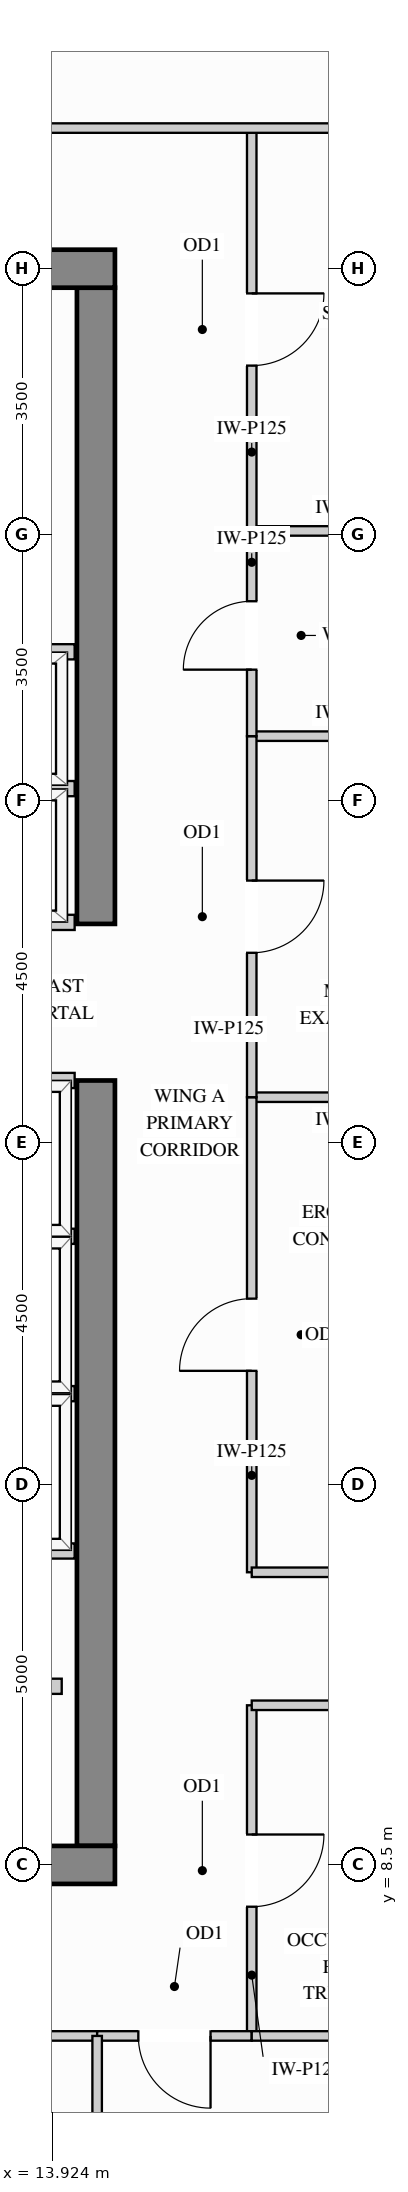
"""IFC4 building model, lengths in metres.
Left out: names, types, materials, properties, quantities, classifications, styles, units other than length and angle.
Written with IfcOpenShell. Run it as: python <this file> out.ifc"""

import sys

from ifc_helpers import new_model, si_unit, direction, frame, frame_2d, origin, place, context, subcontext, project, spatial, rectangle, extrude, source, transform, mapped, element, fill, save


model = new_model("IFC4")
c1 = context("Model", 3, precision=1e-05, world=origin(), true_north=direction((0.0, 1.0)))
c2 = subcontext(c1, "Body", "Model", "MODEL_VIEW")
j1 = project(units=[si_unit("LENGTHUNIT", "METRE"), si_unit("PLANEANGLEUNIT", "RADIAN")], contexts=[c1])
p1 = place(None, origin())
s1 = spatial("IfcSite", under=j1, at=p1, CompositionType="ELEMENT")
p2 = place(p1, origin())
s2 = spatial("IfcBuilding", under=s1, at=p2, CompositionType="ELEMENT")
p3 = place(p2, frame((0.0, 0.0, 248.4)))
s3 = spatial("IfcBuildingStorey", under=s2, at=p3, CompositionType="ELEMENT", Elevation=248.4)
m1 = source(origin(), c2, "Body", "SweptSolid", [
    extrude(rectangle(XDim=10.07, YDim=0.5, at=frame_2d((5.035, 0.0))), origin(), (0.0, 0.0, 1.0), 3.4),
])
p4 = place(p3, frame((14.5, 8.75, 0.0), z_axis=(0.0, 0.0, 1.0), x_axis=(0.0, 1.0, 0.0)))
e1 = element("IfcWall", 1, at=p4, inside=s3, PredefinedType="SHEAR", context=c2, shape_type="MappedRepresentation", body=[
    mapped(m1, transform((0.0, 0.0, 0.0), x_axis=(1.0, 0.0, 0.0), y_axis=(0.0, 1.0, 0.0), z_axis=(0.0, 0.0, 1.0))),
])
m2 = source(origin(), c2, "Body", "SweptSolid", [
    extrude(rectangle(XDim=8.37, YDim=0.5, at=frame_2d((4.185, 0.0))), origin(), (0.0, 0.0, 1.0), 3.4),
])
p5 = place(p3, frame((14.5, 20.88, 0.0), z_axis=(0.0, 0.0, 1.0), x_axis=(0.0, 1.0, 0.0)))
e2 = element("IfcWall", 2, at=p5, inside=s3, PredefinedType="SHEAR", context=c2, shape_type="MappedRepresentation", body=[
    mapped(m2, transform((0.0, 0.0, 0.0), x_axis=(1.0, 0.0, 0.0), y_axis=(0.0, 1.0, 0.0), z_axis=(0.0, 0.0, 1.0))),
])
m3 = source(origin(), c2, "Body", "SweptSolid", [
    extrude(rectangle(XDim=10.5, YDim=0.5, at=frame_2d((5.25, 0.0))), origin(), (0.0, 0.0, 1.0), 3.4),
])
for number, where, z_axis, x_axis in (
    (3, (4.25, 29.5, 0.0), (0.0, 0.0, 1.0), (1.0, 0.0, 0.0)),
    (4, (4.25, 8.5, 0.0), (0.0, 0.0, 1.0), (1.0, 0.0, 0.0)),
):
    element("IfcWall", number, at=place(p3, frame(where, z_axis=z_axis, x_axis=x_axis)), inside=s3, PredefinedType="SHEAR", context=c2, shape_type="MappedRepresentation", body=[
        mapped(m3, transform((0.0, 0.0, 0.0), x_axis=(1.0, 0.0, 0.0), y_axis=(0.0, 1.0, 0.0), z_axis=(0.0, 0.0, 1.0))),
    ])
m4 = source(origin(), c2, "Body", "SweptSolid", [
    extrude(rectangle(XDim=2.598, YDim=0.125, at=frame_2d((1.299, 0.0))), origin(), (0.0, 0.0, 1.0), 3.385),
])
for number, where, z_axis, x_axis in (
    (5, (16.55, 18.6, 0.0), (0.0, 0.0, 1.0), (1.0, 0.0, 0.0)),
    (6, (16.55, 23.35, 0.0), (0.0, 0.0, 1.0), (1.0, 0.0, 0.0)),
    (7, (16.55, 26.05, 0.0), (0.0, 0.0, 1.0), (1.0, 0.0, 0.0)),
):
    element("IfcWall", number, at=place(p3, frame(where, z_axis=z_axis, x_axis=x_axis)), inside=s3, PredefinedType="PARTITIONING", context=c2, shape_type="MappedRepresentation", body=[
        mapped(m4, transform((0.0, 0.0, 0.0), x_axis=(1.0, 0.0, 0.0), y_axis=(0.0, 1.0, 0.0), z_axis=(0.0, 0.0, 1.0))),
    ])
p6 = place(p3, frame((16.55, 12.35, 0.0), z_axis=(0.0, 0.0, 1.0), x_axis=(0.0, 1.0, 0.0)))
e8 = element("IfcWall", 8, at=p6, inside=s3, PredefinedType="PARTITIONING", context=c2, shape_type="SweptSolid", body=[
    extrude(rectangle(XDim=6.25, YDim=0.125, at=frame_2d((3.125, 0.0))), origin(), (0.0, 0.0, 1.0), 3.385),
])
p7 = place(p6, frame((2.65, 0.0, 0.0)))
e9 = element("IfcOpeningElement", 9, at=p7, cuts=e8, PredefinedType="OPENING", context=c2, shape_type="SweptSolid", body=[
    extrude(rectangle(XDim=0.95, YDim=2.15, at=frame_2d((0.475, 1.075))), frame((0.0, 0.073, 0.0), z_axis=(0.0, -1.0, 0.0), x_axis=(1.0, 0.0, 0.0)), (0.0, 0.0, 1.0), 0.145),
])
p8 = place(p3, frame((16.55, 18.6, 0.0), z_axis=(0.0, 0.0, 1.0), x_axis=(0.0, 1.0, 0.0)))
e10 = element("IfcWall", 10, at=p8, inside=s3, PredefinedType="PARTITIONING", context=c2, shape_type="SweptSolid", body=[
    extrude(rectangle(XDim=4.75, YDim=0.125, at=frame_2d((2.375, 0.0))), origin(), (0.0, 0.0, 1.0), 3.385),
])
p9 = place(p8, frame((1.9, 0.0, 0.0)))
e11 = element("IfcOpeningElement", 11, at=p9, cuts=e10, PredefinedType="OPENING", context=c2, shape_type="SweptSolid", body=[
    extrude(rectangle(XDim=0.95, YDim=2.15, at=frame_2d((0.475, 1.075))), frame((0.0, 0.073, 0.0), z_axis=(0.0, -1.0, 0.0), x_axis=(1.0, 0.0, 0.0)), (0.0, 0.0, 1.0), 0.145),
])
p10 = place(p3, frame((16.55, 26.05, 0.0), z_axis=(0.0, 0.0, 1.0), x_axis=(0.0, 1.0, 0.0)))
e12 = element("IfcWall", 12, at=p10, inside=s3, PredefinedType="PARTITIONING", context=c2, shape_type="SweptSolid", body=[
    extrude(rectangle(XDim=5.3, YDim=0.125, at=frame_2d((2.65, 0.0))), origin(), (0.0, 0.0, 1.0), 3.385),
])
p11 = place(p10, frame((2.175, 0.0, 0.0)))
e13 = element("IfcOpeningElement", 13, at=p11, cuts=e12, PredefinedType="OPENING", context=c2, shape_type="SweptSolid", body=[
    extrude(rectangle(XDim=0.95, YDim=2.15, at=frame_2d((0.475, 1.075))), frame((0.0, 0.073, 0.0), z_axis=(0.0, -1.0, 0.0), x_axis=(1.0, 0.0, 0.0)), (0.0, 0.0, 1.0), 0.145),
])
p12 = place(p3, frame((16.55, 6.25, 0.0), z_axis=(0.0, 0.0, 1.0), x_axis=(0.0, 1.0, 0.0)))
e14 = element("IfcWall", 14, at=p12, inside=s3, PredefinedType="PARTITIONING", context=c2, shape_type="SweptSolid", body=[
    extrude(rectangle(XDim=4.35, YDim=0.125, at=frame_2d((2.175, 0.0))), origin(), (0.0, 0.0, 1.0), 3.385),
])
p13 = place(p12, frame((1.7, 0.0, 0.0)))
e15 = element("IfcOpeningElement", 15, at=p13, cuts=e14, PredefinedType="OPENING", context=c2, shape_type="SweptSolid", body=[
    extrude(rectangle(XDim=0.95, YDim=2.15, at=frame_2d((0.475, 1.075))), frame((0.0, 0.073, 0.0), z_axis=(0.0, -1.0, 0.0), x_axis=(1.0, 0.0, 0.0)), (0.0, 0.0, 1.0), 0.145),
])
p14 = place(p3, frame((16.55, 23.35, 0.0), z_axis=(0.0, 0.0, 1.0), x_axis=(0.0, 1.0, 0.0)))
e16 = element("IfcWall", 16, at=p14, inside=s3, PredefinedType="PARTITIONING", context=c2, shape_type="SweptSolid", body=[
    extrude(rectangle(XDim=2.7, YDim=0.125, at=frame_2d((1.35, 0.0))), origin(), (0.0, 0.0, 1.0), 3.385),
])
p15 = place(p14, frame((0.875, 0.0, 0.0)))
e17 = element("IfcOpeningElement", 17, at=p15, cuts=e16, PredefinedType="OPENING", context=c2, shape_type="SweptSolid", body=[
    extrude(rectangle(XDim=0.9, YDim=2.15, at=frame_2d((0.45, 1.075))), frame((0.0, 0.073, 0.0), z_axis=(0.0, -1.0, 0.0), x_axis=(1.0, 0.0, 0.0)), (0.0, 0.0, 1.0), 0.145),
])
m5 = source(origin(), c2, "Body", "SweptSolid", [
    extrude(rectangle(XDim=7.498, YDim=0.125, at=frame_2d((3.749, 0.0))), origin(), (0.0, 0.0, 1.0), 3.385),
])
p16 = place(p3, frame((11.65, 31.35, 0.0), z_axis=(0.0, 0.0, 1.0), x_axis=(1.0, 0.0, 0.0)))
e18 = element("IfcWall", 18, at=p16, inside=s3, PredefinedType="PARTITIONING", context=c2, shape_type="MappedRepresentation", body=[
    mapped(m5, transform((0.0, 0.0, 0.0), x_axis=(1.0, 0.0, 0.0), y_axis=(0.0, 1.0, 0.0), z_axis=(0.0, 0.0, 1.0))),
])
m6 = source(origin(), c2, "Body", "SweptSolid", [
    extrude(rectangle(XDim=2.95, YDim=0.125, at=frame_2d((1.475, 0.0))), origin(), (0.0, 0.0, 1.0), 3.385),
])
for number, where, z_axis, x_axis in (
    (19, (16.55, 12.35, 0.0), (0.0, 0.0, 1.0), (1.0, 0.0, 0.0)),
    (20, (16.55, 10.6, 0.0), (0.0, 0.0, 1.0), (1.0, 0.0, 0.0)),
):
    element("IfcWall", number, at=place(p3, frame(where, z_axis=z_axis, x_axis=x_axis)), inside=s3, PredefinedType="PARTITIONING", context=c2, shape_type="MappedRepresentation", body=[
        mapped(m6, transform((0.0, 0.0, 0.0), x_axis=(1.0, 0.0, 0.0), y_axis=(0.0, 1.0, 0.0), z_axis=(0.0, 0.0, 1.0))),
    ])
p17 = place(p3, frame((8.889, 6.25, 0.0), z_axis=(0.0, 0.0, 1.0), x_axis=(1.0, 0.0, 0.0)))
e21 = element("IfcWall", 21, at=p17, inside=s3, PredefinedType="PARTITIONING", context=c2, shape_type="SweptSolid", body=[
    extrude(rectangle(XDim=5.627, YDim=0.125, at=frame_2d((2.813, 0.0))), origin(), (0.0, 0.0, 1.0), 2.848),
])
p18 = place(p17, frame((2.338, 0.0, 0.0)))
e22 = element("IfcOpeningElement", 22, at=p18, cuts=e21, PredefinedType="OPENING", context=c2, shape_type="SweptSolid", body=[
    extrude(rectangle(XDim=0.95, YDim=2.15, at=frame_2d((0.475, 1.075))), frame((0.0, 0.073, 0.0), z_axis=(0.0, -1.0, 0.0), x_axis=(1.0, 0.0, 0.0)), (0.0, 0.0, 1.0), 0.145),
])
p19 = place(p3, frame((14.516, 6.25, 0.0), z_axis=(0.0, 0.0, 1.0), x_axis=(1.0, 0.0, 0.0)))
e23 = element("IfcWall", 23, at=p19, inside=s3, PredefinedType="PARTITIONING", context=c2, shape_type="SweptSolid", body=[
    extrude(rectangle(XDim=2.034, YDim=0.125, at=frame_2d((1.017, 0.0))), origin(), (0.0, 0.0, 1.0), 2.848),
])
p20 = place(p19, frame((0.542, 0.0, 0.0)))
e24 = element("IfcOpeningElement", 24, at=p20, cuts=e23, PredefinedType="OPENING", context=c2, shape_type="SweptSolid", body=[
    extrude(rectangle(XDim=0.95, YDim=2.15, at=frame_2d((0.475, 1.075))), frame((0.0, 0.073, 0.0), z_axis=(0.0, -1.0, 0.0), x_axis=(1.0, 0.0, 0.0)), (0.0, 0.0, 1.0), 0.145),
])
m7 = source(origin(), c2, "Body", "SweptSolid", [
    extrude(rectangle(XDim=2.598, YDim=0.125, at=frame_2d((1.299, 0.0))), origin(), (0.0, 0.0, 1.0), 2.848),
])
p21 = place(p3, frame((16.55, 6.25, 0.0), z_axis=(0.0, 0.0, 1.0), x_axis=(1.0, 0.0, 0.0)))
e25 = element("IfcWall", 25, at=p21, inside=s3, PredefinedType="PARTITIONING", context=c2, shape_type="MappedRepresentation", body=[
    mapped(m7, transform((0.0, 0.0, 0.0), x_axis=(1.0, 0.0, 0.0), y_axis=(0.0, 1.0, 0.0), z_axis=(0.0, 0.0, 1.0))),
])
m8 = source(origin(), c2, "Body", "SweptSolid", [
    extrude(rectangle(XDim=5.2, YDim=0.125, at=frame_2d((2.6, 0.0))), origin(), (0.0, 0.0, 1.0), 3.385),
])
p22 = place(p3, frame((14.516, 1.05, 0.0), z_axis=(0.0, 0.0, 1.0), x_axis=(0.0, 1.0, 0.0)))
e26 = element("IfcWall", 26, at=p22, inside=s3, PredefinedType="PARTITIONING", context=c2, shape_type="MappedRepresentation", body=[
    mapped(m8, transform((0.0, 0.0, 0.0), x_axis=(1.0, 0.0, 0.0), y_axis=(0.0, 1.0, 0.0), z_axis=(0.0, 0.0, 1.0))),
])
m9 = source(origin(), c2, "Body", "SweptSolid", [
    extrude(rectangle(XDim=1.63, YDim=0.2, at=frame_2d((0.815, 0.0))), origin(), (0.0, 0.0, 1.0), 3.385),
])
p23 = place(p3, frame((12.42, 10.85, 0.0), z_axis=(0.0, 0.0, 1.0), x_axis=(1.0, 0.0, 0.0)))
e27 = element("IfcWall", 27, at=p23, inside=s3, PredefinedType="PARTITIONING", context=c2, shape_type="MappedRepresentation", body=[
    mapped(m9, transform((0.0, 0.0, 0.0), x_axis=(1.0, 0.0, 0.0), y_axis=(0.0, 1.0, 0.0), z_axis=(0.0, 0.0, 1.0))),
])
m10 = source(origin(), c2, "Body", "SweptSolid", [
    extrude(rectangle(XDim=2.39, YDim=0.2, at=frame_2d((1.195, 0.0))), origin(), (0.0, 0.0, 1.0), 3.385),
])
for number, where, z_axis, x_axis in (
    (28, (11.83, 22.66, 0.0), (0.0, 0.0, 1.0), (1.0, 0.0, 0.0)),
    (29, (11.83, 20.9, 0.0), (0.0, 0.0, 1.0), (1.0, 0.0, 0.0)),
    (30, (11.83, 24.46, 0.0), (0.0, 0.0, 1.0), (1.0, 0.0, 0.0)),
):
    element("IfcWall", number, at=place(p3, frame(where, z_axis=z_axis, x_axis=x_axis)), inside=s3, PredefinedType="PARTITIONING", context=c2, shape_type="MappedRepresentation", body=[
        mapped(m10, transform((0.0, 0.0, 0.0), x_axis=(1.0, 0.0, 0.0), y_axis=(0.0, 1.0, 0.0), z_axis=(0.0, 0.0, 1.0))),
    ])
m11 = source(origin(), c2, "Body", "SweptSolid", [
    extrude(rectangle(XDim=1.99, YDim=0.2, at=frame_2d((0.995, 0.0))), origin(), (0.0, 0.0, 1.0), 3.385),
])
for number, where, z_axis, x_axis in (
    (31, (12.23, 14.7, 0.0), (0.0, 0.0, 1.0), (1.0, 0.0, 0.0)),
    (32, (12.23, 12.63, 0.0), (0.0, 0.0, 1.0), (1.0, 0.0, 0.0)),
    (33, (12.23, 16.77, 0.0), (0.0, 0.0, 1.0), (1.0, 0.0, 0.0)),
    (34, (12.23, 18.82, 0.0), (0.0, 0.0, 1.0), (1.0, 0.0, 0.0)),
):
    element("IfcWall", number, at=place(p3, frame(where, z_axis=z_axis, x_axis=x_axis)), inside=s3, PredefinedType="PARTITIONING", context=c2, shape_type="MappedRepresentation", body=[
        mapped(m11, transform((0.0, 0.0, 0.0), x_axis=(1.0, 0.0, 0.0), y_axis=(0.0, 1.0, 0.0), z_axis=(0.0, 0.0, 1.0))),
    ])
m12 = source(origin(), c2, "Body", "SweptSolid", [
    extrude(rectangle(XDim=0.95, YDim=2.15, at=frame_2d((0.475, 1.075))), frame((0.0, 0.025, 0.0), z_axis=(0.0, -1.0, 0.0), x_axis=(1.0, 0.0, 0.0)), (0.0, 0.0, 1.0), 0.05),
])
p24 = place(p13, origin())
e35 = element("IfcDoor", 35, at=p24, inside=s3, OperationType="SINGLE_SWING_RIGHT", PredefinedType="DOOR", context=c2, shape_type="MappedRepresentation", body=[
    mapped(m12, transform((0.0, 0.0, 0.0), x_axis=(1.0, 0.0, 0.0), y_axis=(0.0, 1.0, 0.0), z_axis=(0.0, 0.0, 1.0))),
])
fill(e15, e35)
p25 = place(p7, origin())
e36 = element("IfcDoor", 36, at=p25, inside=s3, OperationType="SINGLE_SWING_LEFT", PredefinedType="DOOR", context=c2, shape_type="MappedRepresentation", body=[
    mapped(m12, transform((0.0, 0.0, 0.0), x_axis=(1.0, 0.0, 0.0), y_axis=(0.0, 1.0, 0.0), z_axis=(0.0, 0.0, 1.0))),
])
fill(e9, e36)
p26 = place(p9, origin())
e37 = element("IfcDoor", 37, at=p26, inside=s3, OperationType="SINGLE_SWING_RIGHT", PredefinedType="DOOR", context=c2, shape_type="MappedRepresentation", body=[
    mapped(m12, transform((0.0, 0.0, 0.0), x_axis=(1.0, 0.0, 0.0), y_axis=(0.0, 1.0, 0.0), z_axis=(0.0, 0.0, 1.0))),
])
fill(e11, e37)
p27 = place(p11, origin())
e38 = element("IfcDoor", 38, at=p27, inside=s3, OperationType="SINGLE_SWING_RIGHT", PredefinedType="DOOR", context=c2, shape_type="MappedRepresentation", body=[
    mapped(m12, transform((0.0, 0.0, 0.0), x_axis=(1.0, 0.0, 0.0), y_axis=(0.0, 1.0, 0.0), z_axis=(0.0, 0.0, 1.0))),
])
fill(e13, e38)
p28 = place(p20, origin())
e39 = element("IfcDoor", 39, at=p28, inside=s3, OperationType="SINGLE_SWING_RIGHT", PredefinedType="DOOR", context=c2, shape_type="MappedRepresentation", body=[
    mapped(m12, transform((0.0, 0.0, 0.0), x_axis=(1.0, 0.0, 0.0), y_axis=(0.0, 1.0, 0.0), z_axis=(0.0, 0.0, 1.0))),
])
fill(e24, e39)
m13 = source(origin(), c2, "Body", "SweptSolid", [
    extrude(rectangle(XDim=0.9, YDim=2.15, at=frame_2d((0.45, 1.075))), frame((0.0, 0.025, 0.0), z_axis=(0.0, -1.0, 0.0), x_axis=(1.0, 0.0, 0.0)), (0.0, 0.0, 1.0), 0.05),
])
p29 = place(p15, origin())
e40 = element("IfcDoor", 40, at=p29, inside=s3, OperationType="SINGLE_SWING_LEFT", PredefinedType="DOOR", context=c2, shape_type="MappedRepresentation", body=[
    mapped(m13, transform((0.0, 0.0, 0.0), x_axis=(1.0, 0.0, 0.0), y_axis=(0.0, 1.0, 0.0), z_axis=(0.0, 0.0, 1.0))),
])
fill(e17, e40)
save(model, sys.argv[1])
